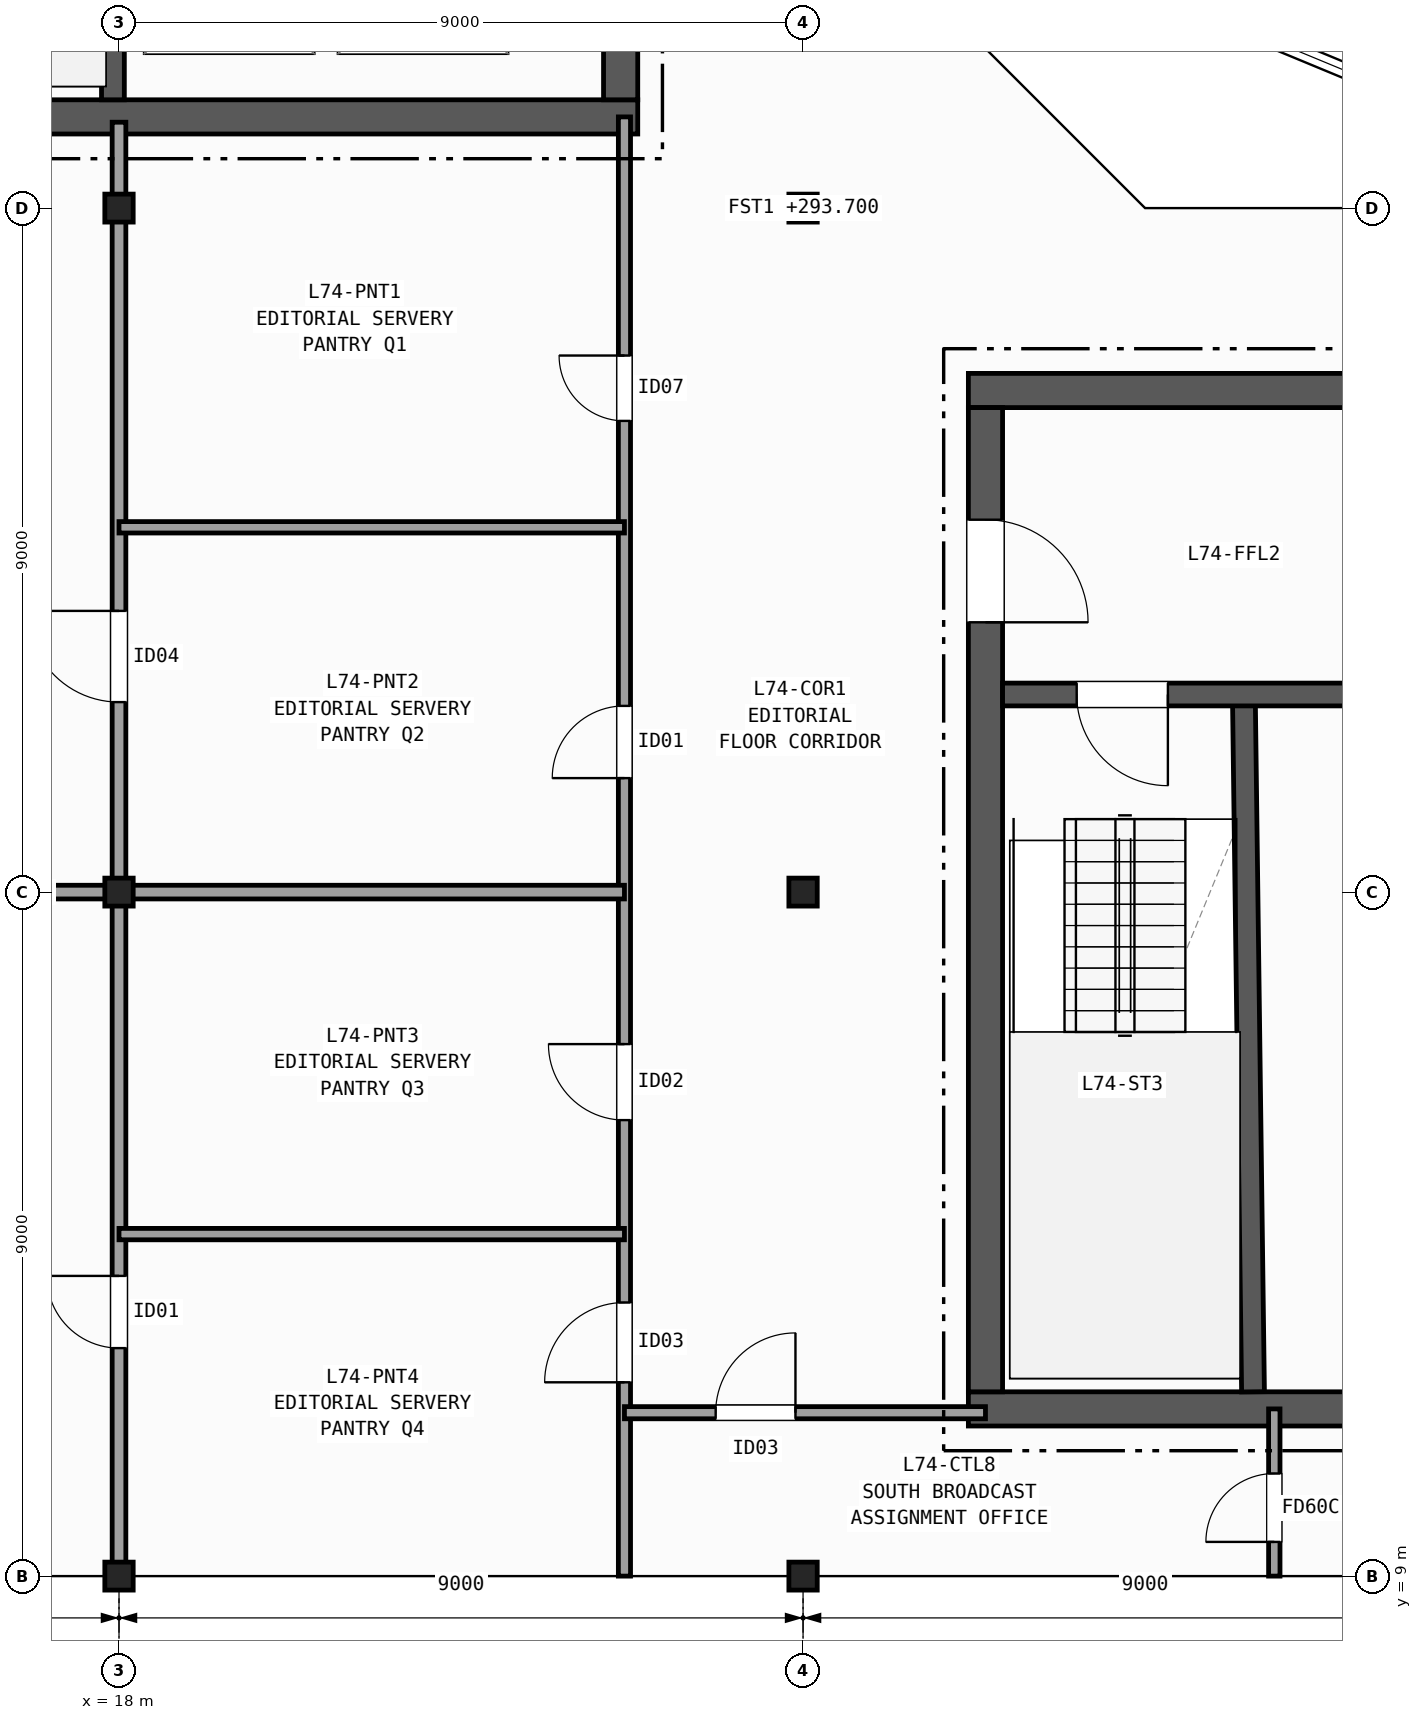
"""IFC4 building model, lengths in metres.
Left out: names, types, materials, properties, quantities, classifications, styles, units other than length and angle.
Written with IfcOpenShell. Run it as: python <this file> out.ifc"""

import sys

from ifc_helpers import new_model, si_unit, direction, frame, frame_2d, origin, origin_2d, place, context, subcontext, project, spatial, rectangle, i_section, extrude, element, fill, save


model = new_model("IFC4")
c1 = context("Model", 3, precision=1e-05, world=origin(), true_north=direction((0.0, 1.0)))
c2 = subcontext(c1, "Body", "Model", "MODEL_VIEW")
j1 = project(units=[si_unit("LENGTHUNIT", "METRE"), si_unit("PLANEANGLEUNIT", "RADIAN")], contexts=[c1])
p1 = place(None, origin())
s1 = spatial("IfcSite", under=j1, at=p1, CompositionType="ELEMENT")
p2 = place(p1, origin())
s2 = spatial("IfcBuilding", under=s1, at=p2, CompositionType="ELEMENT")
p3 = place(p2, frame((0.0, 0.0, 293.7)))
s3 = spatial("IfcBuildingStorey", under=s2, at=p3, CompositionType="ELEMENT", Elevation=293.7)
for number, where, z_axis, x_axis in (
    (1, (18.0, 9.0, 0.0), (0.0, 0.0, 1.0), (1.0, 0.0, 0.0)),
    (2, (18.0, 18.0, 0.0), (0.0, 0.0, 1.0), (1.0, 0.0, 0.0)),
    (3, (18.0, 27.0, 0.0), (0.0, 0.0, 1.0), (1.0, 0.0, 0.0)),
    (4, (27.0, 9.0, 0.0), (0.0, 0.0, 1.0), (1.0, 0.0, 0.0)),
    (5, (27.0, 18.0, 0.0), (0.0, 0.0, 1.0), (1.0, 0.0, 0.0)),
    (6, (27.0, 27.0, 0.0), (0.0, 0.0, 1.0), (1.0, 0.0, 0.0)),
):
    element("IfcColumn", number, at=place(p3, frame(where, z_axis=z_axis, x_axis=x_axis)), inside=s3, PredefinedType="COLUMN", context=c2, shape_type="SweptSolid", body=[
        extrude(i_section(OverallWidth=0.373, OverallDepth=0.368, WebThickness=0.015, FlangeThickness=0.024, FilletRadius=0.015, at=origin_2d()), origin(), (0.0, 0.0, 1.0), 3.7),
    ])
p4 = place(p3, frame((10.975, 28.2, 0.0), z_axis=(0.0, 0.0, 1.0), x_axis=(1.0, 0.0, 0.0)))
e7 = element("IfcWall", 7, at=p4, inside=s3, PredefinedType="SHEAR", context=c2, shape_type="SweptSolid", body=[
    extrude(rectangle(XDim=13.85, YDim=0.45, at=frame_2d((6.925, 0.0))), origin(), (0.0, 0.0, 1.0), 3.37),
])
p5 = place(p3, frame((24.6, 28.425, 0.0), z_axis=(0.0, 0.0, 1.0), x_axis=(0.0, 1.0, 0.0)))
e8 = element("IfcWall", 8, at=p5, inside=s3, PredefinedType="SHEAR", context=c2, shape_type="SweptSolid", body=[
    extrude(rectangle(XDim=13.75, YDim=0.45, at=frame_2d((6.875, 0.0))), origin(), (0.0, 0.0, 1.0), 3.37),
])
p6 = place(p5, frame((3.375, 0.0, 0.0)))
e9 = element("IfcOpeningElement", 9, at=p6, cuts=e8, PredefinedType="OPENING", context=c2, shape_type="SweptSolid", body=[
    extrude(rectangle(XDim=1.5, YDim=2.2, at=frame_2d((0.75, 1.1))), frame((0.0, 0.235, 0.0), z_axis=(0.0, -1.0, 0.0), x_axis=(1.0, 0.0, 0.0)), (0.0, 0.0, 1.0), 0.47),
])
p7 = place(p5, frame((9.975, 0.0, 0.0)))
e10 = element("IfcOpeningElement", 10, at=p7, cuts=e8, PredefinedType="OPENING", context=c2, shape_type="SweptSolid", body=[
    extrude(rectangle(XDim=0.9, YDim=2.1, at=frame_2d((0.45, 1.05))), frame((0.0, 0.235, 0.0), z_axis=(0.0, -1.0, 0.0), x_axis=(1.0, 0.0, 0.0)), (0.0, 0.0, 1.0), 0.47),
])
p8 = place(p5, frame((12.075, 0.0, 0.0)))
e11 = element("IfcOpeningElement", 11, at=p8, cuts=e8, PredefinedType="OPENING", context=c2, shape_type="SweptSolid", body=[
    extrude(rectangle(XDim=0.9, YDim=2.1, at=frame_2d((0.45, 1.05))), frame((0.0, 0.235, 0.0), z_axis=(0.0, -1.0, 0.0), x_axis=(1.0, 0.0, 0.0)), (0.0, 0.0, 1.0), 0.47),
])
p9 = place(p3, frame((17.92, 42.175, 0.0), z_axis=(0.0, 0.0, 1.0), x_axis=(0.0, -1.0, 0.0)))
e12 = element("IfcWall", 12, at=p9, inside=s3, PredefinedType="SHEAR", context=c2, shape_type="SweptSolid", body=[
    extrude(rectangle(XDim=13.75, YDim=0.3, at=frame_2d((6.875, 0.0))), origin(), (0.0, 0.0, 1.0), 3.37),
])
p10 = place(p9, frame((2.0, 0.0, 0.0)))
e13 = element("IfcOpeningElement", 13, at=p10, cuts=e12, PredefinedType="OPENING", context=c2, shape_type="SweptSolid", body=[
    extrude(rectangle(XDim=1.15, YDim=2.15, at=frame_2d((0.575, 1.075))), frame((0.0, 0.16, 0.0), z_axis=(0.0, -1.0, 0.0), x_axis=(1.0, 0.0, 0.0)), (0.0, 0.0, 1.0), 0.32),
])
p11 = place(p3, frame((29.175, 11.2, 0.0), z_axis=(0.0, 0.0, 1.0), x_axis=(1.0, 0.0, 0.0)))
e14 = element("IfcWall", 14, at=p11, inside=s3, PredefinedType="SHEAR", context=c2, shape_type="SweptSolid", body=[
    extrude(rectangle(XDim=13.85, YDim=0.45, at=frame_2d((6.925, 0.0))), origin(), (0.0, 0.0, 1.0), 3.37),
])
p12 = place(p3, frame((43.025, 24.6, 0.0), z_axis=(0.0, 0.0, 1.0), x_axis=(-1.0, 0.0, 0.0)))
e15 = element("IfcWall", 15, at=p12, inside=s3, PredefinedType="SHEAR", context=c2, shape_type="SweptSolid", body=[
    extrude(rectangle(XDim=13.85, YDim=0.45, at=frame_2d((6.925, 0.0))), origin(), (0.0, 0.0, 1.0), 3.37),
])
p13 = place(p12, frame((0.725, 0.0, 0.0)))
e16 = element("IfcOpeningElement", 16, at=p13, cuts=e15, PredefinedType="OPENING", context=c2, shape_type="SweptSolid", body=[
    extrude(rectangle(XDim=1.1, YDim=2.15, at=frame_2d((0.55, 1.075))), frame((0.0, 0.235, 0.0), z_axis=(0.0, -1.0, 0.0), x_axis=(1.0, 0.0, 0.0)), (0.0, 0.0, 1.0), 0.47),
])
p14 = place(p12, frame((2.675, 0.0, 0.0)))
e17 = element("IfcOpeningElement", 17, at=p14, cuts=e15, PredefinedType="OPENING", context=c2, shape_type="SweptSolid", body=[
    extrude(rectangle(XDim=0.9, YDim=2.1, at=frame_2d((0.45, 1.05))), frame((0.0, 0.235, 0.0), z_axis=(0.0, -1.0, 0.0), x_axis=(1.0, 0.0, 0.0)), (0.0, 0.0, 1.0), 0.47),
])
p15 = place(p12, frame((4.575, 0.0, 0.0)))
e18 = element("IfcOpeningElement", 18, at=p15, cuts=e15, PredefinedType="OPENING", context=c2, shape_type="SweptSolid", body=[
    extrude(rectangle(XDim=0.9, YDim=2.1, at=frame_2d((0.45, 1.05))), frame((0.0, 0.235, 0.0), z_axis=(0.0, -1.0, 0.0), x_axis=(1.0, 0.0, 0.0)), (0.0, 0.0, 1.0), 0.47),
])
p16 = place(p3, frame((29.4, 24.375, 0.0), z_axis=(0.0, 0.0, 1.0), x_axis=(0.0, -1.0, 0.0)))
e19 = element("IfcWall", 19, at=p16, inside=s3, PredefinedType="SHEAR", context=c2, shape_type="SweptSolid", body=[
    extrude(rectangle(XDim=12.95, YDim=0.45, at=frame_2d((6.475, 0.0))), origin(), (0.0, 0.0, 1.0), 3.37),
])
p17 = place(p16, frame((1.475, 0.0, 0.0)))
e20 = element("IfcOpeningElement", 20, at=p17, cuts=e19, PredefinedType="OPENING", context=c2, shape_type="SweptSolid", body=[
    extrude(rectangle(XDim=1.35, YDim=2.15, at=frame_2d((0.675, 1.075))), frame((0.0, 0.235, 0.0), z_axis=(0.0, -1.0, 0.0), x_axis=(1.0, 0.0, 0.0)), (0.0, 0.0, 1.0), 0.47),
])
p18 = place(p3, frame((32.92, 11.425, 0.0), z_axis=(0.0, 0.0, 1.0), x_axis=(-0.013135638869, 0.999913723774, 0.0)))
e21 = element("IfcWall", 21, at=p18, inside=s3, PredefinedType="SHEAR", context=c2, shape_type="SweptSolid", body=[
    extrude(rectangle(XDim=9.126, YDim=0.3, at=frame_2d((4.563, 0.0))), origin(), (0.0, 0.0, 1.0), 3.37),
])
p19 = place(p3, frame((34.5, 20.6, 0.0), z_axis=(0.0, 0.0, 1.0), x_axis=(-1.0, 0.0, 0.0)))
e22 = element("IfcWall", 22, at=p19, inside=s3, PredefinedType="SHEAR", context=c2, shape_type="SweptSolid", body=[
    extrude(rectangle(XDim=4.875, YDim=0.3, at=frame_2d((2.438, 0.0))), origin(), (0.0, 0.0, 1.0), 3.37),
])
p20 = place(p19, frame((2.7, 0.0, 0.0)))
e23 = element("IfcOpeningElement", 23, at=p20, cuts=e22, PredefinedType="OPENING", context=c2, shape_type="SweptSolid", body=[
    extrude(rectangle(XDim=1.2, YDim=2.15, at=frame_2d((0.6, 1.075))), frame((0.0, 0.16, 0.0), z_axis=(0.0, -1.0, 0.0), x_axis=(1.0, 0.0, 0.0)), (0.0, 0.0, 1.0), 0.32),
])
p21 = place(p3, frame((24.65, 9.0, 0.0), z_axis=(0.0, 0.0, 1.0), x_axis=(0.0, 1.0, 0.0)))
e24 = element("IfcWall", 24, at=p21, inside=s3, PredefinedType="PARTITIONING", context=c2, shape_type="SweptSolid", body=[
    extrude(rectangle(XDim=19.2, YDim=0.16, at=frame_2d((9.6, 0.0))), origin(), (0.0, 0.0, 1.0), 2.657),
])
p22 = place(p21, frame((15.2, 0.0, 0.0)))
e25 = element("IfcOpeningElement", 25, at=p22, cuts=e24, PredefinedType="OPENING", context=c2, shape_type="SweptSolid", body=[
    extrude(rectangle(XDim=0.86, YDim=2.05, at=frame_2d((0.43, 1.025))), frame((0.0, 0.09, 0.0), z_axis=(0.0, -1.0, 0.0), x_axis=(1.0, 0.0, 0.0)), (0.0, 0.0, 1.0), 0.18),
])
p23 = place(p21, frame((10.5, 0.0, 0.0)))
e26 = element("IfcOpeningElement", 26, at=p23, cuts=e24, PredefinedType="OPENING", context=c2, shape_type="SweptSolid", body=[
    extrude(rectangle(XDim=0.95, YDim=2.1, at=frame_2d((0.475, 1.05))), frame((0.0, 0.09, 0.0), z_axis=(0.0, -1.0, 0.0), x_axis=(1.0, 0.0, 0.0)), (0.0, 0.0, 1.0), 0.18),
])
p24 = place(p21, frame((6.0, 0.0, 0.0)))
e27 = element("IfcOpeningElement", 27, at=p24, cuts=e24, PredefinedType="OPENING", context=c2, shape_type="SweptSolid", body=[
    extrude(rectangle(XDim=1.0, YDim=2.1, at=frame_2d((0.5, 1.05))), frame((0.0, 0.09, 0.0), z_axis=(0.0, -1.0, 0.0), x_axis=(1.0, 0.0, 0.0)), (0.0, 0.0, 1.0), 0.18),
])
p25 = place(p21, frame((2.55, 0.0, 0.0)))
e28 = element("IfcOpeningElement", 28, at=p25, cuts=e24, PredefinedType="OPENING", context=c2, shape_type="SweptSolid", body=[
    extrude(rectangle(XDim=1.05, YDim=2.15, at=frame_2d((0.525, 1.075))), frame((0.0, 0.09, 0.0), z_axis=(0.0, -1.0, 0.0), x_axis=(1.0, 0.0, 0.0)), (0.0, 0.0, 1.0), 0.18),
])
p26 = place(p3, frame((9.0, 18.0, 0.0), z_axis=(0.0, 0.0, 1.0), x_axis=(1.0, 0.0, 0.0)))
e29 = element("IfcWall", 29, at=p26, inside=s3, PredefinedType="PARTITIONING", context=c2, shape_type="SweptSolid", body=[
    extrude(rectangle(XDim=15.65, YDim=0.18, at=frame_2d((7.825, 0.0))), origin(), (0.0, 0.0, 1.0), 2.657),
])
p27 = place(p3, frame((18.0, 9.0, 0.0), z_axis=(0.0, 0.0, 1.0), x_axis=(0.0, 1.0, 0.0)))
e30 = element("IfcWall", 30, at=p27, inside=s3, PredefinedType="PARTITIONING", context=c2, shape_type="SweptSolid", body=[
    extrude(rectangle(XDim=19.13, YDim=0.18, at=frame_2d((9.565, 0.0))), origin(), (0.0, 0.0, 1.0), 2.657),
])
p28 = place(p27, frame((11.5, 0.0, 0.0)))
e31 = element("IfcOpeningElement", 31, at=p28, cuts=e30, PredefinedType="OPENING", context=c2, shape_type="SweptSolid", body=[
    extrude(rectangle(XDim=1.2, YDim=2.15, at=frame_2d((0.6, 1.075))), frame((0.0, 0.1, 0.0), z_axis=(0.0, -1.0, 0.0), x_axis=(1.0, 0.0, 0.0)), (0.0, 0.0, 1.0), 0.2),
])
p29 = place(p27, frame((3.0, 0.0, 0.0)))
e32 = element("IfcOpeningElement", 32, at=p29, cuts=e30, PredefinedType="OPENING", context=c2, shape_type="SweptSolid", body=[
    extrude(rectangle(XDim=0.95, YDim=2.1, at=frame_2d((0.475, 1.05))), frame((0.0, 0.1, 0.0), z_axis=(0.0, -1.0, 0.0), x_axis=(1.0, 0.0, 0.0)), (0.0, 0.0, 1.0), 0.2),
])
for number, where, z_axis, x_axis in (
    (33, (18.0, 22.8, 0.0), (0.0, 0.0, 1.0), (1.0, 0.0, 0.0)),
    (34, (18.0, 13.5, 0.0), (0.0, 0.0, 1.0), (1.0, 0.0, 0.0)),
):
    element("IfcWall", number, at=place(p3, frame(where, z_axis=z_axis, x_axis=x_axis)), inside=s3, PredefinedType="PARTITIONING", context=c2, shape_type="SweptSolid", body=[
        extrude(rectangle(XDim=6.65, YDim=0.15, at=frame_2d((3.325, 0.0))), origin(), (0.0, 0.0, 1.0), 2.742),
    ])
p30 = place(p3, frame((24.65, 11.15, 0.0), z_axis=(0.0, 0.0, 1.0), x_axis=(1.0, 0.0, 0.0)))
e35 = element("IfcWall", 35, at=p30, inside=s3, PredefinedType="PARTITIONING", context=c2, shape_type="SweptSolid", body=[
    extrude(rectangle(XDim=4.75, YDim=0.16, at=frame_2d((2.375, 0.0))), origin(), (0.0, 0.0, 1.0), 2.742),
])
p31 = place(p30, frame((1.2, 0.0, 0.0)))
e36 = element("IfcOpeningElement", 36, at=p31, cuts=e35, PredefinedType="OPENING", context=c2, shape_type="SweptSolid", body=[
    extrude(rectangle(XDim=1.05, YDim=2.15, at=frame_2d((0.525, 1.075))), frame((0.0, 0.09, 0.0), z_axis=(0.0, -1.0, 0.0), x_axis=(1.0, 0.0, 0.0)), (0.0, 0.0, 1.0), 0.18),
])
p32 = place(p3, frame((33.2, 9.0, 0.0), z_axis=(0.0, 0.0, 1.0), x_axis=(0.0, 1.0, 0.0)))
e37 = element("IfcWall", 37, at=p32, inside=s3, PredefinedType="PARTITIONING", context=c2, shape_type="SweptSolid", body=[
    extrude(rectangle(XDim=2.2, YDim=0.15, at=frame_2d((1.1, 0.0))), origin(), (0.0, 0.0, 1.0), 2.657),
])
p33 = place(p32, frame((0.45, 0.0, 0.0)))
e38 = element("IfcOpeningElement", 38, at=p33, cuts=e37, PredefinedType="OPENING", context=c2, shape_type="SweptSolid", body=[
    extrude(rectangle(XDim=0.9, YDim=2.1, at=frame_2d((0.45, 1.05))), frame((0.0, 0.085, 0.0), z_axis=(0.0, -1.0, 0.0), x_axis=(1.0, 0.0, 0.0)), (0.0, 0.0, 1.0), 0.17),
])
p34 = place(p20, origin())
e39 = element("IfcDoor", 39, at=p34, inside=s3, OperationType="SINGLE_SWING_LEFT", PredefinedType="DOOR", context=c2, shape_type="SweptSolid", body=[
    extrude(rectangle(XDim=1.2, YDim=2.15, at=frame_2d((0.6, 1.075))), frame((0.0, 0.025, 0.0), z_axis=(0.0, -1.0, 0.0), x_axis=(1.0, 0.0, 0.0)), (0.0, 0.0, 1.0), 0.05),
])
fill(e23, e39)
p35 = place(p17, origin())
e40 = element("IfcDoor", 40, at=p35, inside=s3, OperationType="SINGLE_SWING_RIGHT", PredefinedType="DOOR", context=c2, shape_type="SweptSolid", body=[
    extrude(rectangle(XDim=1.35, YDim=2.15, at=frame_2d((0.675, 1.075))), frame((0.0, 0.025, 0.0), z_axis=(0.0, -1.0, 0.0), x_axis=(1.0, 0.0, 0.0)), (0.0, 0.0, 1.0), 0.05),
])
fill(e20, e40)
p36 = place(p22, origin())
e41 = element("IfcDoor", 41, at=p36, inside=s3, OperationType="SINGLE_SWING_RIGHT", PredefinedType="DOOR", context=c2, shape_type="SweptSolid", body=[
    extrude(rectangle(XDim=0.86, YDim=2.05, at=frame_2d((0.43, 1.025))), frame((0.0, 0.025, 0.0), z_axis=(0.0, -1.0, 0.0), x_axis=(1.0, 0.0, 0.0)), (0.0, 0.0, 1.0), 0.05),
])
fill(e25, e41)
p37 = place(p23, origin())
e42 = element("IfcDoor", 42, at=p37, inside=s3, OperationType="SINGLE_SWING_LEFT", PredefinedType="DOOR", context=c2, shape_type="SweptSolid", body=[
    extrude(rectangle(XDim=0.95, YDim=2.1, at=frame_2d((0.475, 1.05))), frame((0.0, 0.025, 0.0), z_axis=(0.0, -1.0, 0.0), x_axis=(1.0, 0.0, 0.0)), (0.0, 0.0, 1.0), 0.05),
])
fill(e26, e42)
p38 = place(p24, origin())
e43 = element("IfcDoor", 43, at=p38, inside=s3, OperationType="SINGLE_SWING_RIGHT", PredefinedType="DOOR", context=c2, shape_type="SweptSolid", body=[
    extrude(rectangle(XDim=1.0, YDim=2.1, at=frame_2d((0.5, 1.05))), frame((0.0, 0.025, 0.0), z_axis=(0.0, -1.0, 0.0), x_axis=(1.0, 0.0, 0.0)), (0.0, 0.0, 1.0), 0.05),
])
fill(e27, e43)
p39 = place(p25, origin())
e44 = element("IfcDoor", 44, at=p39, inside=s3, OperationType="SINGLE_SWING_LEFT", PredefinedType="DOOR", context=c2, shape_type="SweptSolid", body=[
    extrude(rectangle(XDim=1.05, YDim=2.15, at=frame_2d((0.525, 1.075))), frame((0.0, 0.025, 0.0), z_axis=(0.0, -1.0, 0.0), x_axis=(1.0, 0.0, 0.0)), (0.0, 0.0, 1.0), 0.05),
])
fill(e28, e44)
p40 = place(p28, origin())
e45 = element("IfcDoor", 45, at=p40, inside=s3, OperationType="SINGLE_SWING_RIGHT", PredefinedType="DOOR", context=c2, shape_type="SweptSolid", body=[
    extrude(rectangle(XDim=1.2, YDim=2.15, at=frame_2d((0.6, 1.075))), frame((0.0, 0.025, 0.0), z_axis=(0.0, -1.0, 0.0), x_axis=(1.0, 0.0, 0.0)), (0.0, 0.0, 1.0), 0.05),
])
fill(e31, e45)
p41 = place(p29, origin())
e46 = element("IfcDoor", 46, at=p41, inside=s3, OperationType="SINGLE_SWING_RIGHT", PredefinedType="DOOR", context=c2, shape_type="SweptSolid", body=[
    extrude(rectangle(XDim=0.95, YDim=2.1, at=frame_2d((0.475, 1.05))), frame((0.0, 0.025, 0.0), z_axis=(0.0, -1.0, 0.0), x_axis=(1.0, 0.0, 0.0)), (0.0, 0.0, 1.0), 0.05),
])
fill(e32, e46)
p42 = place(p31, origin())
e47 = element("IfcDoor", 47, at=p42, inside=s3, OperationType="SINGLE_SWING_RIGHT", PredefinedType="DOOR", context=c2, shape_type="SweptSolid", body=[
    extrude(rectangle(XDim=1.05, YDim=2.15, at=frame_2d((0.525, 1.075))), frame((0.0, 0.025, 0.0), z_axis=(0.0, -1.0, 0.0), x_axis=(1.0, 0.0, 0.0)), (0.0, 0.0, 1.0), 0.05),
])
fill(e36, e47)
p43 = place(p33, origin())
e48 = element("IfcDoor", 48, at=p43, inside=s3, OperationType="SINGLE_SWING_LEFT", PredefinedType="DOOR", context=c2, shape_type="SweptSolid", body=[
    extrude(rectangle(XDim=0.9, YDim=2.1, at=frame_2d((0.45, 1.05))), frame((0.0, 0.025, 0.0), z_axis=(0.0, -1.0, 0.0), x_axis=(1.0, 0.0, 0.0)), (0.0, 0.0, 1.0), 0.05),
])
fill(e38, e48)
save(model, sys.argv[1])
